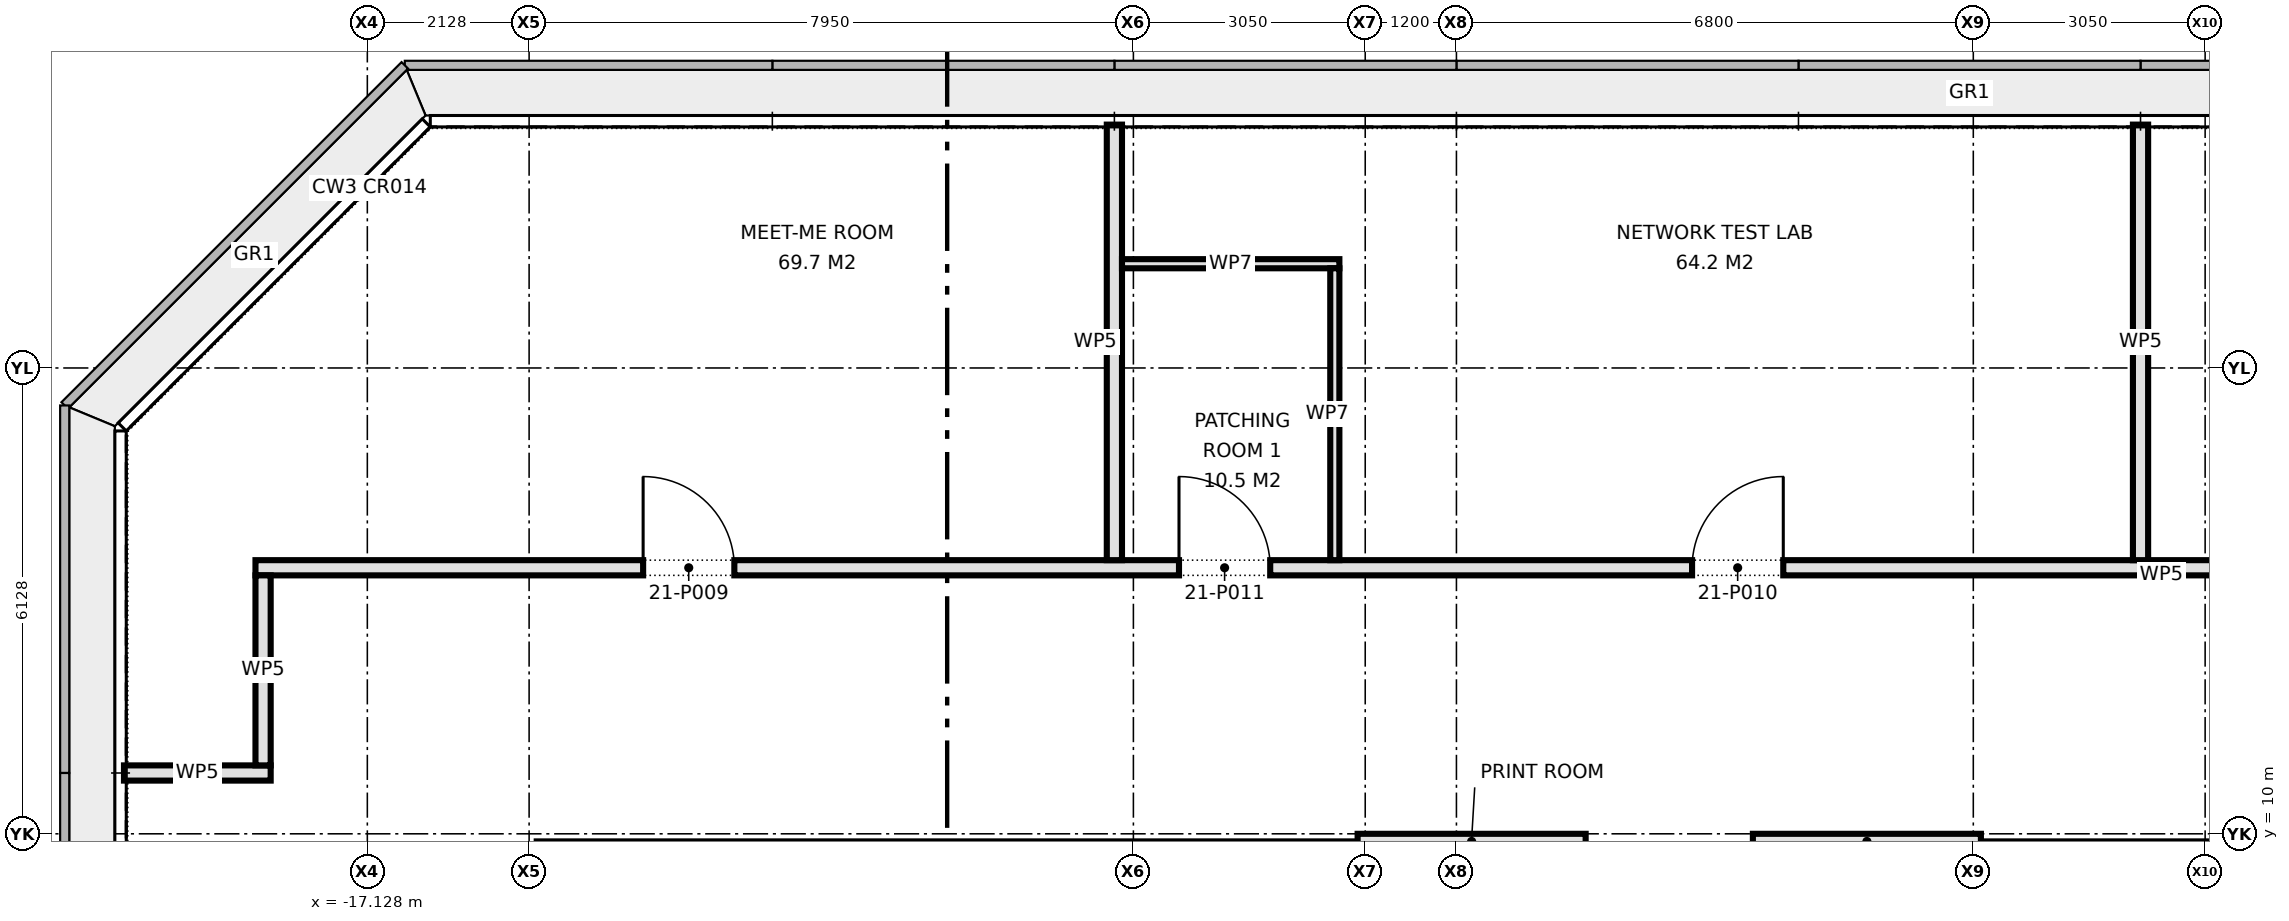
"""IFC4 building model, lengths in metres.
Left out: names, types, materials, properties, quantities, classifications, styles, units other than length and angle.
Written with IfcOpenShell. Run it as: python <this file> out.ifc"""

import sys

from ifc_helpers import new_model, si_unit, direction, frame, frame_2d, origin, place, context, subcontext, project, spatial, rectangle, extrude, element, fill, save


model = new_model("IFC4")
c1 = context("Model", 3, precision=1e-05, world=origin(), true_north=direction((0.0, 1.0)))
c2 = subcontext(c1, "Body", "Model", "MODEL_VIEW")
j1 = project(units=[si_unit("LENGTHUNIT", "METRE"), si_unit("PLANEANGLEUNIT", "RADIAN")], contexts=[c1])
p1 = place(None, origin())
s1 = spatial("IfcSite", under=j1, at=p1, CompositionType="ELEMENT")
p2 = place(p1, origin())
s2 = spatial("IfcBuilding", under=s1, at=p2, CompositionType="ELEMENT")
p3 = place(p2, frame((0.0, 0.0, 95.2)))
s3 = spatial("IfcBuildingStorey", under=s2, at=p3, CompositionType="ELEMENT", Elevation=95.2)
for number, where, z_axis, x_axis in (
    (1, (-4.1, 9.9, 0.0), (0.0, 0.0, 1.0), (1.0, 0.0, 0.0)),
    (2, (1.1, 9.9, 0.0), (0.0, 0.0, 1.0), (1.0, 0.0, 0.0)),
):
    element("IfcWall", number, at=place(p3, frame(where, z_axis=z_axis, x_axis=x_axis)), inside=s3, PredefinedType="PARTITIONING", context=c2, shape_type="SweptSolid", body=[
        extrude(rectangle(XDim=3.0, YDim=0.2, at=frame_2d((1.5, 0.0))), origin(), (0.0, 0.0, 1.0), 3.263),
    ])
p4 = place(p3, frame((-20.33, 10.8, 0.0), z_axis=(0.0, 0.0, 1.0), x_axis=(1.0, 0.0, 0.0)))
e3 = element("IfcWall", 3, at=p4, inside=s3, PredefinedType="PARTITIONING", context=c2, shape_type="SweptSolid", body=[
    extrude(rectangle(XDim=1.93, YDim=0.2, at=frame_2d((0.965, 0.0))), origin(), (0.0, 0.0, 1.0), 4.2),
])
p5 = place(p3, frame((-18.6, 13.5, 0.0), z_axis=(0.0, 0.0, 1.0), x_axis=(1.0, 0.0, 0.0)))
e4 = element("IfcWall", 4, at=p5, inside=s3, PredefinedType="PARTITIONING", context=c2, shape_type="SweptSolid", body=[
    extrude(rectangle(XDim=37.2, YDim=0.2, at=frame_2d((18.6, 0.0))), origin(), (0.0, 0.0, 1.0), 4.2),
])
p6 = place(p5, frame((5.1, 0.0, 0.0)))
e5 = element("IfcOpeningElement", 5, at=p6, cuts=e4, PredefinedType="OPENING", context=c2, shape_type="SweptSolid", body=[
    extrude(rectangle(XDim=1.2, YDim=2.1, at=frame_2d((0.6, 1.05))), frame((0.0, 0.11, 0.0), z_axis=(0.0, -1.0, 0.0), x_axis=(1.0, 0.0, 0.0)), (0.0, 0.0, 1.0), 0.22),
])
p7 = place(p5, frame((18.9, 0.0, 0.0)))
e6 = element("IfcOpeningElement", 6, at=p7, cuts=e4, PredefinedType="OPENING", context=c2, shape_type="SweptSolid", body=[
    extrude(rectangle(XDim=1.2, YDim=2.1, at=frame_2d((0.6, 1.05))), frame((0.0, 0.11, 0.0), z_axis=(0.0, -1.0, 0.0), x_axis=(1.0, 0.0, 0.0)), (0.0, 0.0, 1.0), 0.22),
])
p8 = place(p5, frame((12.15, 0.0, 0.0)))
e7 = element("IfcOpeningElement", 7, at=p8, cuts=e4, PredefinedType="OPENING", context=c2, shape_type="SweptSolid", body=[
    extrude(rectangle(XDim=1.2, YDim=2.1, at=frame_2d((0.6, 1.05))), frame((0.0, 0.11, 0.0), z_axis=(0.0, -1.0, 0.0), x_axis=(1.0, 0.0, 0.0)), (0.0, 0.0, 1.0), 0.22),
])
p9 = place(p5, frame((30.05, 0.0, 0.0)))
e8 = element("IfcOpeningElement", 8, at=p9, cuts=e4, PredefinedType="OPENING", context=c2, shape_type="SweptSolid", body=[
    extrude(rectangle(XDim=1.8, YDim=2.1, at=frame_2d((0.9, 1.05))), frame((0.0, 0.11, 0.0), z_axis=(0.0, -1.0, 0.0), x_axis=(1.0, 0.0, 0.0)), (0.0, 0.0, 1.0), 0.22),
])
for number, where, z_axis, x_axis in (
    (9, (6.2, 13.6, 0.0), (0.0, 0.0, 1.0), (0.0, 1.0, 0.0)),
    (10, (-7.3, 13.6, 0.0), (0.0, 0.0, 1.0), (0.0, 1.0, 0.0)),
):
    element("IfcWall", number, at=place(p3, frame(where, z_axis=z_axis, x_axis=x_axis)), inside=s3, PredefinedType="PARTITIONING", context=c2, shape_type="SweptSolid", body=[
        extrude(rectangle(XDim=5.73, YDim=0.2, at=frame_2d((2.865, 0.0))), origin(), (0.0, 0.0, 1.0), 4.2),
    ])
p10 = place(p3, frame((-18.5, 10.9, 0.0), z_axis=(0.0, 0.0, 1.0), x_axis=(0.0, 1.0, 0.0)))
e11 = element("IfcWall", 11, at=p10, inside=s3, PredefinedType="PARTITIONING", context=c2, shape_type="SweptSolid", body=[
    extrude(rectangle(XDim=2.5, YDim=0.2, at=frame_2d((1.25, 0.0))), origin(), (0.0, 0.0, 1.0), 4.2),
])
p11 = place(p3, frame((-7.2, 17.5, 0.0), z_axis=(0.0, 0.0, 1.0), x_axis=(1.0, 0.0, 0.0)))
e12 = element("IfcWall", 12, at=p11, inside=s3, PredefinedType="PARTITIONING", context=c2, shape_type="SweptSolid", body=[
    extrude(rectangle(XDim=2.86, YDim=0.12, at=frame_2d((1.43, 0.0))), origin(), (0.0, 0.0, 1.0), 4.2),
])
p12 = place(p3, frame((-4.4, 13.6, 0.0), z_axis=(0.0, 0.0, 1.0), x_axis=(0.0, 1.0, 0.0)))
e13 = element("IfcWall", 13, at=p12, inside=s3, PredefinedType="PARTITIONING", context=c2, shape_type="SweptSolid", body=[
    extrude(rectangle(XDim=3.84, YDim=0.12, at=frame_2d((1.92, 0.0))), origin(), (0.0, 0.0, 1.0), 4.2),
])
p13 = place(p6, origin())
e14 = element("IfcDoor", 14, at=p13, inside=s3, OperationType="SINGLE_SWING_LEFT", PredefinedType="DOOR", context=c2, shape_type="SweptSolid", body=[
    extrude(rectangle(XDim=1.2, YDim=2.1, at=frame_2d((0.6, 1.05))), frame((0.0, 0.025, 0.0), z_axis=(0.0, -1.0, 0.0), x_axis=(1.0, 0.0, 0.0)), (0.0, 0.0, 1.0), 0.05),
])
fill(e5, e14)
p14 = place(p7, origin())
e15 = element("IfcDoor", 15, at=p14, inside=s3, OperationType="SINGLE_SWING_RIGHT", PredefinedType="DOOR", context=c2, shape_type="SweptSolid", body=[
    extrude(rectangle(XDim=1.2, YDim=2.1, at=frame_2d((0.6, 1.05))), frame((0.0, 0.025, 0.0), z_axis=(0.0, -1.0, 0.0), x_axis=(1.0, 0.0, 0.0)), (0.0, 0.0, 1.0), 0.05),
])
fill(e6, e15)
p15 = place(p8, origin())
e16 = element("IfcDoor", 16, at=p15, inside=s3, OperationType="SINGLE_SWING_LEFT", PredefinedType="DOOR", context=c2, shape_type="SweptSolid", body=[
    extrude(rectangle(XDim=1.2, YDim=2.1, at=frame_2d((0.6, 1.05))), frame((0.0, 0.025, 0.0), z_axis=(0.0, -1.0, 0.0), x_axis=(1.0, 0.0, 0.0)), (0.0, 0.0, 1.0), 0.05),
])
fill(e7, e16)
save(model, sys.argv[1])
